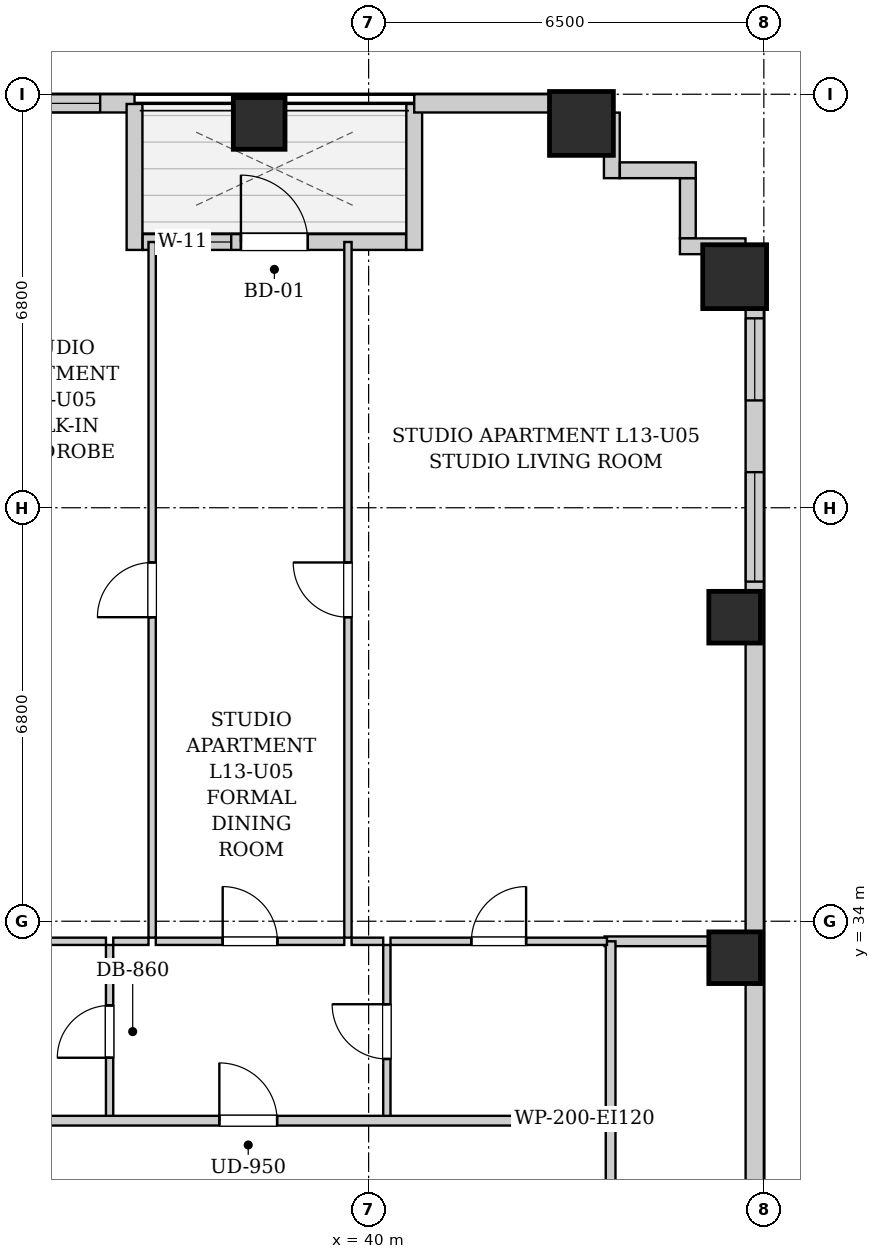
"""IFC4 building model, lengths in metres.
Left out: names, types, materials, properties, quantities, classifications, styles, units other than length and angle.
Written with IfcOpenShell. Run it as: python <this file> out.ifc"""

import sys

from ifc_helpers import new_model, si_unit, direction, frame, frame_2d, origin, origin_2d, place, context, subcontext, project, spatial, rectangle, extrude, element, fill, save


model = new_model("IFC4")
c1 = context("Model", 3, precision=1e-05, world=origin(), true_north=direction((0.0, 1.0)))
c2 = subcontext(c1, "Body", "Model", "MODEL_VIEW")
j1 = project(units=[si_unit("LENGTHUNIT", "METRE"), si_unit("PLANEANGLEUNIT", "RADIAN")], contexts=[c1])
p1 = place(None, origin())
s1 = spatial("IfcSite", under=j1, at=p1, CompositionType="ELEMENT")
p2 = place(p1, origin())
s2 = spatial("IfcBuilding", under=s1, at=p2, CompositionType="ELEMENT")
p3 = place(p2, frame((0.0, 0.0, 51.4)))
s3 = spatial("IfcBuildingStorey", under=s2, at=p3, CompositionType="ELEMENT", Elevation=51.4)
p4 = place(p3, frame((38.2, 47.12, 0.0), z_axis=(0.0, 0.0, 1.0), x_axis=(1.0, 0.0, 0.0)))
e1 = element("IfcColumn", 1, at=p4, inside=s3, PredefinedType="COLUMN", context=c2, shape_type="SweptSolid", body=[
    extrude(rectangle(XDim=0.85, YDim=0.85, at=origin_2d()), origin(), (0.0, 0.0, 1.0), 3.2),
])
p5 = place(p3, frame((43.5, 47.12, 0.0), z_axis=(0.0, 0.0, 1.0), x_axis=(1.0, 0.0, 0.0)))
e2 = element("IfcColumn", 2, at=p5, inside=s3, PredefinedType="COLUMN", context=c2, shape_type="SweptSolid", body=[
    extrude(rectangle(XDim=1.05, YDim=1.05, at=origin_2d()), origin(), (0.0, 0.0, 1.0), 3.2),
])
for number, where, z_axis, x_axis in (
    (3, (46.02, 33.4, 0.0), (0.0, 0.0, 1.0), (1.0, 0.0, 0.0)),
    (4, (46.02, 39.0, 0.0), (0.0, 0.0, 1.0), (1.0, 0.0, 0.0)),
):
    element("IfcColumn", number, at=place(p3, frame(where, z_axis=z_axis, x_axis=x_axis)), inside=s3, PredefinedType="COLUMN", context=c2, shape_type="SweptSolid", body=[
        extrude(rectangle(XDim=0.85, YDim=0.85, at=origin_2d()), origin(), (0.0, 0.0, 1.0), 3.2),
    ])
p6 = place(p3, frame((46.02, 44.6, 0.0), z_axis=(0.0, 0.0, 1.0), x_axis=(1.0, 0.0, 0.0)))
e5 = element("IfcColumn", 5, at=p6, inside=s3, PredefinedType="COLUMN", context=c2, shape_type="SweptSolid", body=[
    extrude(rectangle(XDim=1.05, YDim=1.05, at=origin_2d()), origin(), (0.0, 0.0, 1.0), 3.2),
])
p7 = place(p3, frame((10.0, 47.45, 0.0), z_axis=(0.0, 0.0, 1.0), x_axis=(1.0, 0.0, 0.0)))
e6 = element("IfcWall", 6, at=p7, inside=s3, PredefinedType="SOLIDWALL", context=c2, shape_type="SweptSolid", body=[
    extrude(rectangle(XDim=26.15, YDim=0.3, at=frame_2d((13.075, 0.0))), origin(), (0.0, 0.0, 1.0), 1.975),
])
p8 = place(p7, frame((5.862, 0.0, 0.55)))
e7 = element("IfcOpeningElement", 7, at=p8, cuts=e6, PredefinedType="OPENING", context=c2, shape_type="SweptSolid", body=[
    extrude(rectangle(XDim=1.35, YDim=1.2, at=frame_2d((0.675, 0.6))), frame((0.0, 0.16, 0.0), z_axis=(0.0, -1.0, 0.0), x_axis=(1.0, 0.0, 0.0)), (0.0, 0.0, 1.0), 0.32),
])
p9 = place(p7, frame((8.944, 0.0, 0.55)))
e8 = element("IfcOpeningElement", 8, at=p9, cuts=e6, PredefinedType="OPENING", context=c2, shape_type="SweptSolid", body=[
    extrude(rectangle(XDim=1.8, YDim=1.2, at=frame_2d((0.9, 0.6))), frame((0.0, 0.16, 0.0), z_axis=(0.0, -1.0, 0.0), x_axis=(1.0, 0.0, 0.0)), (0.0, 0.0, 1.0), 0.32),
])
p10 = place(p7, frame((18.788, 0.0, 0.55)))
e9 = element("IfcOpeningElement", 9, at=p10, cuts=e6, PredefinedType="OPENING", context=c2, shape_type="SweptSolid", body=[
    extrude(rectangle(XDim=1.8, YDim=1.2, at=frame_2d((0.9, 0.6))), frame((0.0, 0.16, 0.0), z_axis=(0.0, -1.0, 0.0), x_axis=(1.0, 0.0, 0.0)), (0.0, 0.0, 1.0), 0.32),
])
p11 = place(p7, frame((21.265, 0.0, 0.55)))
e10 = element("IfcOpeningElement", 10, at=p11, cuts=e6, PredefinedType="OPENING", context=c2, shape_type="SweptSolid", body=[
    extrude(rectangle(XDim=1.35, YDim=1.2, at=frame_2d((0.675, 0.6))), frame((0.0, 0.16, 0.0), z_axis=(0.0, -1.0, 0.0), x_axis=(1.0, 0.0, 0.0)), (0.0, 0.0, 1.0), 0.32),
])
p12 = place(p7, frame((23.785, 0.0, 0.55)))
e11 = element("IfcOpeningElement", 11, at=p12, cuts=e6, PredefinedType="OPENING", context=c2, shape_type="SweptSolid", body=[
    extrude(rectangle(XDim=1.8, YDim=1.2, at=frame_2d((0.9, 0.6))), frame((0.0, 0.16, 0.0), z_axis=(0.0, -1.0, 0.0), x_axis=(1.0, 0.0, 0.0)), (0.0, 0.0, 1.0), 0.32),
])
p13 = place(p3, frame((36.15, 47.44, 0.0), z_axis=(0.0, 0.0, 1.0), x_axis=(0.0, -1.0, 0.0)))
e12 = element("IfcWall", 12, at=p13, inside=s3, PredefinedType="SOLIDWALL", context=c2, shape_type="SweptSolid", body=[
    extrude(rectangle(XDim=2.4, YDim=0.26, at=frame_2d((1.2, 0.0))), origin(), (0.0, 0.0, 1.0), 2.94),
])
p14 = place(p3, frame((36.284, 45.17, 0.0), z_axis=(0.0, 0.0, 1.0), x_axis=(1.0, 0.0, 0.0)))
e13 = element("IfcWall", 13, at=p14, inside=s3, PredefinedType="SOLIDWALL", context=c2, shape_type="SweptSolid", body=[
    extrude(rectangle(XDim=4.332, YDim=0.26, at=frame_2d((2.166, 0.0))), origin(), (0.0, 0.0, 1.0), 2.94),
])
p15 = place(p14, frame((1.616, 0.0, 0.0)))
e14 = element("IfcOpeningElement", 14, at=p15, cuts=e13, PredefinedType="OPENING", context=c2, shape_type="SweptSolid", body=[
    extrude(rectangle(XDim=1.1, YDim=2.0, at=frame_2d((0.55, 1.0))), frame((0.0, 0.14, 0.0), z_axis=(0.0, -1.0, 0.0), x_axis=(1.0, 0.0, 0.0)), (0.0, 0.0, 1.0), 0.28),
])
p16 = place(p14, frame((0.606, 0.0, 0.55)))
e15 = element("IfcOpeningElement", 15, at=p16, cuts=e13, PredefinedType="OPENING", context=c2, shape_type="SweptSolid", body=[
    extrude(rectangle(XDim=0.85, YDim=1.2, at=frame_2d((0.425, 0.6))), frame((0.0, 0.14, 0.0), z_axis=(0.0, -1.0, 0.0), x_axis=(1.0, 0.0, 0.0)), (0.0, 0.0, 1.0), 0.28),
])
p17 = place(p3, frame((40.75, 45.04, 0.0), z_axis=(0.0, 0.0, 1.0), x_axis=(0.0, 1.0, 0.0)))
e16 = element("IfcWall", 16, at=p17, inside=s3, PredefinedType="SOLIDWALL", context=c2, shape_type="SweptSolid", body=[
    extrude(rectangle(XDim=2.4, YDim=0.26, at=frame_2d((1.2, 0.0))), origin(), (0.0, 0.0, 1.0), 2.94),
])
p18 = place(p3, frame((40.75, 47.45, 0.0), z_axis=(0.0, 0.0, 1.0), x_axis=(1.0, 0.0, 0.0)))
e17 = element("IfcWall", 17, at=p18, inside=s3, PredefinedType="SOLIDWALL", context=c2, shape_type="SweptSolid", body=[
    extrude(rectangle(XDim=3.25, YDim=0.3, at=frame_2d((1.625, 0.0))), origin(), (0.0, 0.0, 1.0), 1.975),
])
p19 = place(p3, frame((46.35, 45.1, 0.0), z_axis=(0.0, 0.0, 1.0), x_axis=(0.0, -1.0, 0.0)))
e18 = element("IfcWall", 18, at=p19, inside=s3, PredefinedType="SOLIDWALL", context=c2, shape_type="SweptSolid", body=[
    extrude(rectangle(XDim=16.9, YDim=0.3, at=frame_2d((8.45, 0.0))), origin(), (0.0, 0.0, 1.0), 1.975),
])
p20 = place(p19, frame((3.715, 0.0, 0.55)))
e19 = element("IfcOpeningElement", 19, at=p20, cuts=e18, PredefinedType="OPENING", context=c2, shape_type="SweptSolid", body=[
    extrude(rectangle(XDim=1.8, YDim=1.2, at=frame_2d((0.9, 0.6))), frame((0.0, 0.16, 0.0), z_axis=(0.0, -1.0, 0.0), x_axis=(1.0, 0.0, 0.0)), (0.0, 0.0, 1.0), 0.32),
])
p21 = place(p19, frame((1.185, 0.0, 0.55)))
e20 = element("IfcOpeningElement", 20, at=p21, cuts=e18, PredefinedType="OPENING", context=c2, shape_type="SweptSolid", body=[
    extrude(rectangle(XDim=1.35, YDim=1.2, at=frame_2d((0.675, 0.6))), frame((0.0, 0.16, 0.0), z_axis=(0.0, -1.0, 0.0), x_axis=(1.0, 0.0, 0.0)), (0.0, 0.0, 1.0), 0.32),
])
p22 = place(p3, frame((44.0, 47.298, 0.0), z_axis=(0.0, 0.0, 1.0), x_axis=(0.0, -1.0, 0.0)))
e21 = element("IfcWall", 21, at=p22, inside=s3, PredefinedType="SOLIDWALL", context=c2, shape_type="SweptSolid", body=[
    extrude(rectangle(XDim=1.078, YDim=0.26, at=frame_2d((0.539, 0.0))), origin(), (0.0, 0.0, 1.0), 2.94),
])
p23 = place(p3, frame((44.132, 46.35, 0.0), z_axis=(0.0, 0.0, 1.0), x_axis=(1.0, 0.0, 0.0)))
e22 = element("IfcWall", 22, at=p23, inside=s3, PredefinedType="SOLIDWALL", context=c2, shape_type="SweptSolid", body=[
    extrude(rectangle(XDim=1.248, YDim=0.26, at=frame_2d((0.624, 0.0))), origin(), (0.0, 0.0, 1.0), 2.94),
])
p24 = place(p3, frame((45.25, 46.218, 0.0), z_axis=(0.0, 0.0, 1.0), x_axis=(0.0, -1.0, 0.0)))
e23 = element("IfcWall", 23, at=p24, inside=s3, PredefinedType="SOLIDWALL", context=c2, shape_type="SweptSolid", body=[
    extrude(rectangle(XDim=0.986, YDim=0.26, at=frame_2d((0.493, 0.0))), origin(), (0.0, 0.0, 1.0), 2.94),
])
p25 = place(p3, frame((45.12, 45.1, 0.0), z_axis=(0.0, 0.0, 1.0), x_axis=(1.0, 0.0, 0.0)))
e24 = element("IfcWall", 24, at=p25, inside=s3, PredefinedType="SOLIDWALL", context=c2, shape_type="SweptSolid", body=[
    extrude(rectangle(XDim=1.078, YDim=0.26, at=frame_2d((0.539, 0.0))), origin(), (0.0, 0.0, 1.0), 2.94),
])
p26 = place(p3, frame((43.98, 28.98, 0.0), z_axis=(0.0, 0.0, 1.0), x_axis=(0.0, 1.0, 0.0)))
e25 = element("IfcWall", 25, at=p26, inside=s3, PredefinedType="PARTITIONING", context=c2, shape_type="SweptSolid", body=[
    extrude(rectangle(XDim=1.74, YDim=0.16, at=frame_2d((0.87, 0.0))), origin(), (0.0, 0.0, 1.0), 2.94),
])
p27 = place(p3, frame((43.88, 33.67, 0.0), z_axis=(0.0, 0.0, 1.0), x_axis=(1.0, 0.0, 0.0)))
e26 = element("IfcWall", 26, at=p27, inside=s3, PredefinedType="PARTITIONING", context=c2, shape_type="SweptSolid", body=[
    extrude(rectangle(XDim=2.34, YDim=0.16, at=frame_2d((1.17, 0.0))), origin(), (0.0, 0.0, 1.0), 2.94),
])
p28 = place(p3, frame((43.98, 30.76, 0.0), z_axis=(0.0, 0.0, 1.0), x_axis=(0.0, 1.0, 0.0)))
e27 = element("IfcWall", 27, at=p28, inside=s3, PredefinedType="PARTITIONING", context=c2, shape_type="SweptSolid", body=[
    extrude(rectangle(XDim=2.91, YDim=0.16, at=frame_2d((1.455, 0.0))), origin(), (0.0, 0.0, 1.0), 2.94),
])
p29 = place(p3, frame((35.74, 30.76, 0.0), z_axis=(0.0, 0.0, 1.0), x_axis=(0.0, 1.0, 0.0)))
e28 = element("IfcWall", 28, at=p29, inside=s3, PredefinedType="PARTITIONING", context=c2, shape_type="SweptSolid", body=[
    extrude(rectangle(XDim=2.85, YDim=0.12, at=frame_2d((1.425, 0.0))), origin(), (0.0, 0.0, 1.0), 2.94),
])
p30 = place(p29, frame((0.995, 0.0, 0.0)))
e29 = element("IfcOpeningElement", 29, at=p30, cuts=e28, PredefinedType="OPENING", context=c2, shape_type="SweptSolid", body=[
    extrude(rectangle(XDim=0.86, YDim=2.05, at=frame_2d((0.43, 1.025))), frame((0.0, 0.07, 0.0), z_axis=(0.0, -1.0, 0.0), x_axis=(1.0, 0.0, 0.0)), (0.0, 0.0, 1.0), 0.14),
])
p31 = place(p3, frame((33.28, 33.67, 0.0), z_axis=(0.0, 0.0, 1.0), x_axis=(1.0, 0.0, 0.0)))
e30 = element("IfcWall", 30, at=p31, inside=s3, PredefinedType="PARTITIONING", context=c2, shape_type="SweptSolid", body=[
    extrude(rectangle(XDim=2.4, YDim=0.12, at=frame_2d((1.2, 0.0))), origin(), (0.0, 0.0, 1.0), 2.94),
])
p32 = place(p3, frame((40.3, 30.76, 0.0), z_axis=(0.0, 0.0, 1.0), x_axis=(0.0, 1.0, 0.0)))
e31 = element("IfcWall", 31, at=p32, inside=s3, PredefinedType="PARTITIONING", context=c2, shape_type="SweptSolid", body=[
    extrude(rectangle(XDim=2.85, YDim=0.12, at=frame_2d((1.425, 0.0))), origin(), (0.0, 0.0, 1.0), 2.94),
])
p33 = place(p32, frame((0.975, 0.0, 0.0)))
e32 = element("IfcOpeningElement", 32, at=p33, cuts=e31, PredefinedType="OPENING", context=c2, shape_type="SweptSolid", body=[
    extrude(rectangle(XDim=0.9, YDim=2.05, at=frame_2d((0.45, 1.025))), frame((0.0, 0.07, 0.0), z_axis=(0.0, -1.0, 0.0), x_axis=(1.0, 0.0, 0.0)), (0.0, 0.0, 1.0), 0.14),
])
p34 = place(p3, frame((35.8, 33.67, 0.0), z_axis=(0.0, 0.0, 1.0), x_axis=(1.0, 0.0, 0.0)))
e33 = element("IfcWall", 33, at=p34, inside=s3, PredefinedType="PARTITIONING", context=c2, shape_type="SweptSolid", body=[
    extrude(rectangle(XDim=0.58, YDim=0.12, at=frame_2d((0.29, 0.0))), origin(), (0.0, 0.0, 1.0), 2.94),
])
p35 = place(p3, frame((36.5, 33.67, 0.0), z_axis=(0.0, 0.0, 1.0), x_axis=(1.0, 0.0, 0.0)))
e34 = element("IfcWall", 34, at=p35, inside=s3, PredefinedType="PARTITIONING", context=c2, shape_type="SweptSolid", body=[
    extrude(rectangle(XDim=3.1, YDim=0.12, at=frame_2d((1.55, 0.0))), origin(), (0.0, 0.0, 1.0), 2.94),
])
p36 = place(p35, frame((1.1, 0.0, 0.0)))
e35 = element("IfcOpeningElement", 35, at=p36, cuts=e34, PredefinedType="OPENING", context=c2, shape_type="SweptSolid", body=[
    extrude(rectangle(XDim=0.9, YDim=2.05, at=frame_2d((0.45, 1.025))), frame((0.0, 0.07, 0.0), z_axis=(0.0, -1.0, 0.0), x_axis=(1.0, 0.0, 0.0)), (0.0, 0.0, 1.0), 0.14),
])
p37 = place(p3, frame((39.72, 33.67, 0.0), z_axis=(0.0, 0.0, 1.0), x_axis=(1.0, 0.0, 0.0)))
e36 = element("IfcWall", 36, at=p37, inside=s3, PredefinedType="PARTITIONING", context=c2, shape_type="SweptSolid", body=[
    extrude(rectangle(XDim=0.52, YDim=0.12, at=frame_2d((0.26, 0.0))), origin(), (0.0, 0.0, 1.0), 2.94),
])
p38 = place(p3, frame((40.36, 33.67, 0.0), z_axis=(0.0, 0.0, 1.0), x_axis=(1.0, 0.0, 0.0)))
e37 = element("IfcWall", 37, at=p38, inside=s3, PredefinedType="PARTITIONING", context=c2, shape_type="SweptSolid", body=[
    extrude(rectangle(XDim=3.56, YDim=0.12, at=frame_2d((1.78, 0.0))), origin(), (0.0, 0.0, 1.0), 2.94),
])
p39 = place(p38, frame((1.33, 0.0, 0.0)))
e38 = element("IfcOpeningElement", 38, at=p39, cuts=e37, PredefinedType="OPENING", context=c2, shape_type="SweptSolid", body=[
    extrude(rectangle(XDim=0.9, YDim=2.05, at=frame_2d((0.45, 1.025))), frame((0.0, 0.07, 0.0), z_axis=(0.0, -1.0, 0.0), x_axis=(1.0, 0.0, 0.0)), (0.0, 0.0, 1.0), 0.14),
])
p40 = place(p3, frame((36.44, 33.73, 0.0), z_axis=(0.0, 0.0, 1.0), x_axis=(0.0, 1.0, 0.0)))
e39 = element("IfcWall", 39, at=p40, inside=s3, PredefinedType="PARTITIONING", context=c2, shape_type="SweptSolid", body=[
    extrude(rectangle(XDim=11.44, YDim=0.12, at=frame_2d((5.72, 0.0))), origin(), (0.0, 0.0, 1.0), 2.94),
])
p41 = place(p40, frame((5.27, 0.0, 0.0)))
e40 = element("IfcOpeningElement", 40, at=p41, cuts=e39, PredefinedType="OPENING", context=c2, shape_type="SweptSolid", body=[
    extrude(rectangle(XDim=0.9, YDim=2.05, at=frame_2d((0.45, 1.025))), frame((0.0, 0.07, 0.0), z_axis=(0.0, -1.0, 0.0), x_axis=(1.0, 0.0, 0.0)), (0.0, 0.0, 1.0), 0.14),
])
p42 = place(p3, frame((39.66, 33.73, 0.0), z_axis=(0.0, 0.0, 1.0), x_axis=(0.0, 1.0, 0.0)))
e41 = element("IfcWall", 41, at=p42, inside=s3, PredefinedType="PARTITIONING", context=c2, shape_type="SweptSolid", body=[
    extrude(rectangle(XDim=11.44, YDim=0.12, at=frame_2d((5.72, 0.0))), origin(), (0.0, 0.0, 1.0), 2.94),
])
p43 = place(p42, frame((5.27, 0.0, 0.0)))
e42 = element("IfcOpeningElement", 42, at=p43, cuts=e41, PredefinedType="OPENING", context=c2, shape_type="SweptSolid", body=[
    extrude(rectangle(XDim=0.9, YDim=2.05, at=frame_2d((0.45, 1.025))), frame((0.0, 0.07, 0.0), z_axis=(0.0, -1.0, 0.0), x_axis=(1.0, 0.0, 0.0)), (0.0, 0.0, 1.0), 0.14),
])
p44 = place(p3, frame((10.05, 30.72, 0.0), z_axis=(0.0, 0.0, 1.0), x_axis=(1.0, 0.0, 0.0)))
e43 = element("IfcWall", 43, at=p44, inside=s3, PredefinedType="PARTITIONING", context=c2, shape_type="SweptSolid", body=[
    extrude(rectangle(XDim=33.9, YDim=0.16, at=frame_2d((16.95, 0.0))), origin(), (0.0, 0.0, 1.0), 2.94),
])
p45 = place(p44, frame((4.165, 0.0, 0.0)))
e44 = element("IfcOpeningElement", 44, at=p45, cuts=e43, PredefinedType="OPENING", context=c2, shape_type="SweptSolid", body=[
    extrude(rectangle(XDim=0.95, YDim=2.1, at=frame_2d((0.475, 1.05))), frame((0.0, 0.09, 0.0), z_axis=(0.0, -1.0, 0.0), x_axis=(1.0, 0.0, 0.0)), (0.0, 0.0, 1.0), 0.18),
])
p46 = place(p44, frame((27.495, 0.0, 0.0)))
e45 = element("IfcOpeningElement", 45, at=p46, cuts=e43, PredefinedType="OPENING", context=c2, shape_type="SweptSolid", body=[
    extrude(rectangle(XDim=0.95, YDim=2.1, at=frame_2d((0.475, 1.05))), frame((0.0, 0.09, 0.0), z_axis=(0.0, -1.0, 0.0), x_axis=(1.0, 0.0, 0.0)), (0.0, 0.0, 1.0), 0.18),
])
p47 = place(p30, origin())
e46 = element("IfcDoor", 46, at=p47, inside=s3, OperationType="SINGLE_SWING_LEFT", PredefinedType="DOOR", context=c2, shape_type="SweptSolid", body=[
    extrude(rectangle(XDim=0.86, YDim=2.05, at=frame_2d((0.43, 1.025))), frame((0.0, 0.025, 0.0), z_axis=(0.0, -1.0, 0.0), x_axis=(1.0, 0.0, 0.0)), (0.0, 0.0, 1.0), 0.05),
])
fill(e29, e46)
p48 = place(p33, origin())
e47 = element("IfcDoor", 47, at=p48, inside=s3, OperationType="SINGLE_SWING_RIGHT", PredefinedType="DOOR", context=c2, shape_type="SweptSolid", body=[
    extrude(rectangle(XDim=0.9, YDim=2.05, at=frame_2d((0.45, 1.025))), frame((0.0, 0.025, 0.0), z_axis=(0.0, -1.0, 0.0), x_axis=(1.0, 0.0, 0.0)), (0.0, 0.0, 1.0), 0.05),
])
fill(e32, e47)
p49 = place(p36, origin())
e48 = element("IfcDoor", 48, at=p49, inside=s3, OperationType="SINGLE_SWING_LEFT", PredefinedType="DOOR", context=c2, shape_type="SweptSolid", body=[
    extrude(rectangle(XDim=0.9, YDim=2.05, at=frame_2d((0.45, 1.025))), frame((0.0, 0.025, 0.0), z_axis=(0.0, -1.0, 0.0), x_axis=(1.0, 0.0, 0.0)), (0.0, 0.0, 1.0), 0.05),
])
fill(e35, e48)
p50 = place(p39, origin())
e49 = element("IfcDoor", 49, at=p50, inside=s3, OperationType="SINGLE_SWING_RIGHT", PredefinedType="DOOR", context=c2, shape_type="SweptSolid", body=[
    extrude(rectangle(XDim=0.9, YDim=2.05, at=frame_2d((0.45, 1.025))), frame((0.0, 0.025, 0.0), z_axis=(0.0, -1.0, 0.0), x_axis=(1.0, 0.0, 0.0)), (0.0, 0.0, 1.0), 0.05),
])
fill(e38, e49)
p51 = place(p41, origin())
e50 = element("IfcDoor", 50, at=p51, inside=s3, OperationType="SINGLE_SWING_LEFT", PredefinedType="DOOR", context=c2, shape_type="SweptSolid", body=[
    extrude(rectangle(XDim=0.9, YDim=2.05, at=frame_2d((0.45, 1.025))), frame((0.0, 0.025, 0.0), z_axis=(0.0, -1.0, 0.0), x_axis=(1.0, 0.0, 0.0)), (0.0, 0.0, 1.0), 0.05),
])
fill(e40, e50)
p52 = place(p43, origin())
e51 = element("IfcDoor", 51, at=p52, inside=s3, OperationType="SINGLE_SWING_RIGHT", PredefinedType="DOOR", context=c2, shape_type="SweptSolid", body=[
    extrude(rectangle(XDim=0.9, YDim=2.05, at=frame_2d((0.45, 1.025))), frame((0.0, 0.025, 0.0), z_axis=(0.0, -1.0, 0.0), x_axis=(1.0, 0.0, 0.0)), (0.0, 0.0, 1.0), 0.05),
])
fill(e42, e51)
p53 = place(p46, origin())
e52 = element("IfcDoor", 52, at=p53, inside=s3, OperationType="SINGLE_SWING_LEFT", PredefinedType="DOOR", context=c2, shape_type="SweptSolid", body=[
    extrude(rectangle(XDim=0.95, YDim=2.1, at=frame_2d((0.475, 1.05))), frame((0.0, 0.025, 0.0), z_axis=(0.0, -1.0, 0.0), x_axis=(1.0, 0.0, 0.0)), (0.0, 0.0, 1.0), 0.05),
])
fill(e45, e52)
p54 = place(p15, origin())
e53 = element("IfcDoor", 53, at=p54, inside=s3, OperationType="SINGLE_SWING_LEFT", PredefinedType="DOOR", context=c2, shape_type="SweptSolid", body=[
    extrude(rectangle(XDim=1.1, YDim=2.0, at=frame_2d((0.55, 1.0))), frame((0.0, 0.025, 0.0), z_axis=(0.0, -1.0, 0.0), x_axis=(1.0, 0.0, 0.0)), (0.0, 0.0, 1.0), 0.05),
])
fill(e14, e53)
p55 = place(p12, origin())
e54 = element("IfcWindow", 54, at=p55, inside=s3, PartitioningType="DOUBLE_PANEL_VERTICAL", PredefinedType="WINDOW", context=c2, shape_type="SweptSolid", body=[
    extrude(rectangle(XDim=1.8, YDim=1.2, at=frame_2d((0.9, 0.6))), frame((0.0, 0.03, 0.0), z_axis=(0.0, -1.0, 0.0), x_axis=(1.0, 0.0, 0.0)), (0.0, 0.0, 1.0), 0.06),
])
fill(e11, e54)
p56 = place(p16, origin())
e55 = element("IfcWindow", 55, at=p56, inside=s3, PartitioningType="SINGLE_PANEL", PredefinedType="WINDOW", context=c2, shape_type="SweptSolid", body=[
    extrude(rectangle(XDim=0.85, YDim=1.2, at=frame_2d((0.425, 0.6))), frame((0.0, 0.03, 0.0), z_axis=(0.0, -1.0, 0.0), x_axis=(1.0, 0.0, 0.0)), (0.0, 0.0, 1.0), 0.06),
])
fill(e15, e55)
p57 = place(p20, origin())
e56 = element("IfcWindow", 56, at=p57, inside=s3, PartitioningType="DOUBLE_PANEL_VERTICAL", PredefinedType="WINDOW", context=c2, shape_type="SweptSolid", body=[
    extrude(rectangle(XDim=1.8, YDim=1.2, at=frame_2d((0.9, 0.6))), frame((0.0, 0.03, 0.0), z_axis=(0.0, -1.0, 0.0), x_axis=(1.0, 0.0, 0.0)), (0.0, 0.0, 1.0), 0.06),
])
fill(e19, e56)
p58 = place(p21, origin())
e57 = element("IfcWindow", 57, at=p58, inside=s3, PartitioningType="SINGLE_PANEL", PredefinedType="WINDOW", context=c2, shape_type="SweptSolid", body=[
    extrude(rectangle(XDim=1.35, YDim=1.2, at=frame_2d((0.675, 0.6))), frame((0.0, 0.03, 0.0), z_axis=(0.0, -1.0, 0.0), x_axis=(1.0, 0.0, 0.0)), (0.0, 0.0, 1.0), 0.06),
])
fill(e20, e57)
save(model, sys.argv[1])
